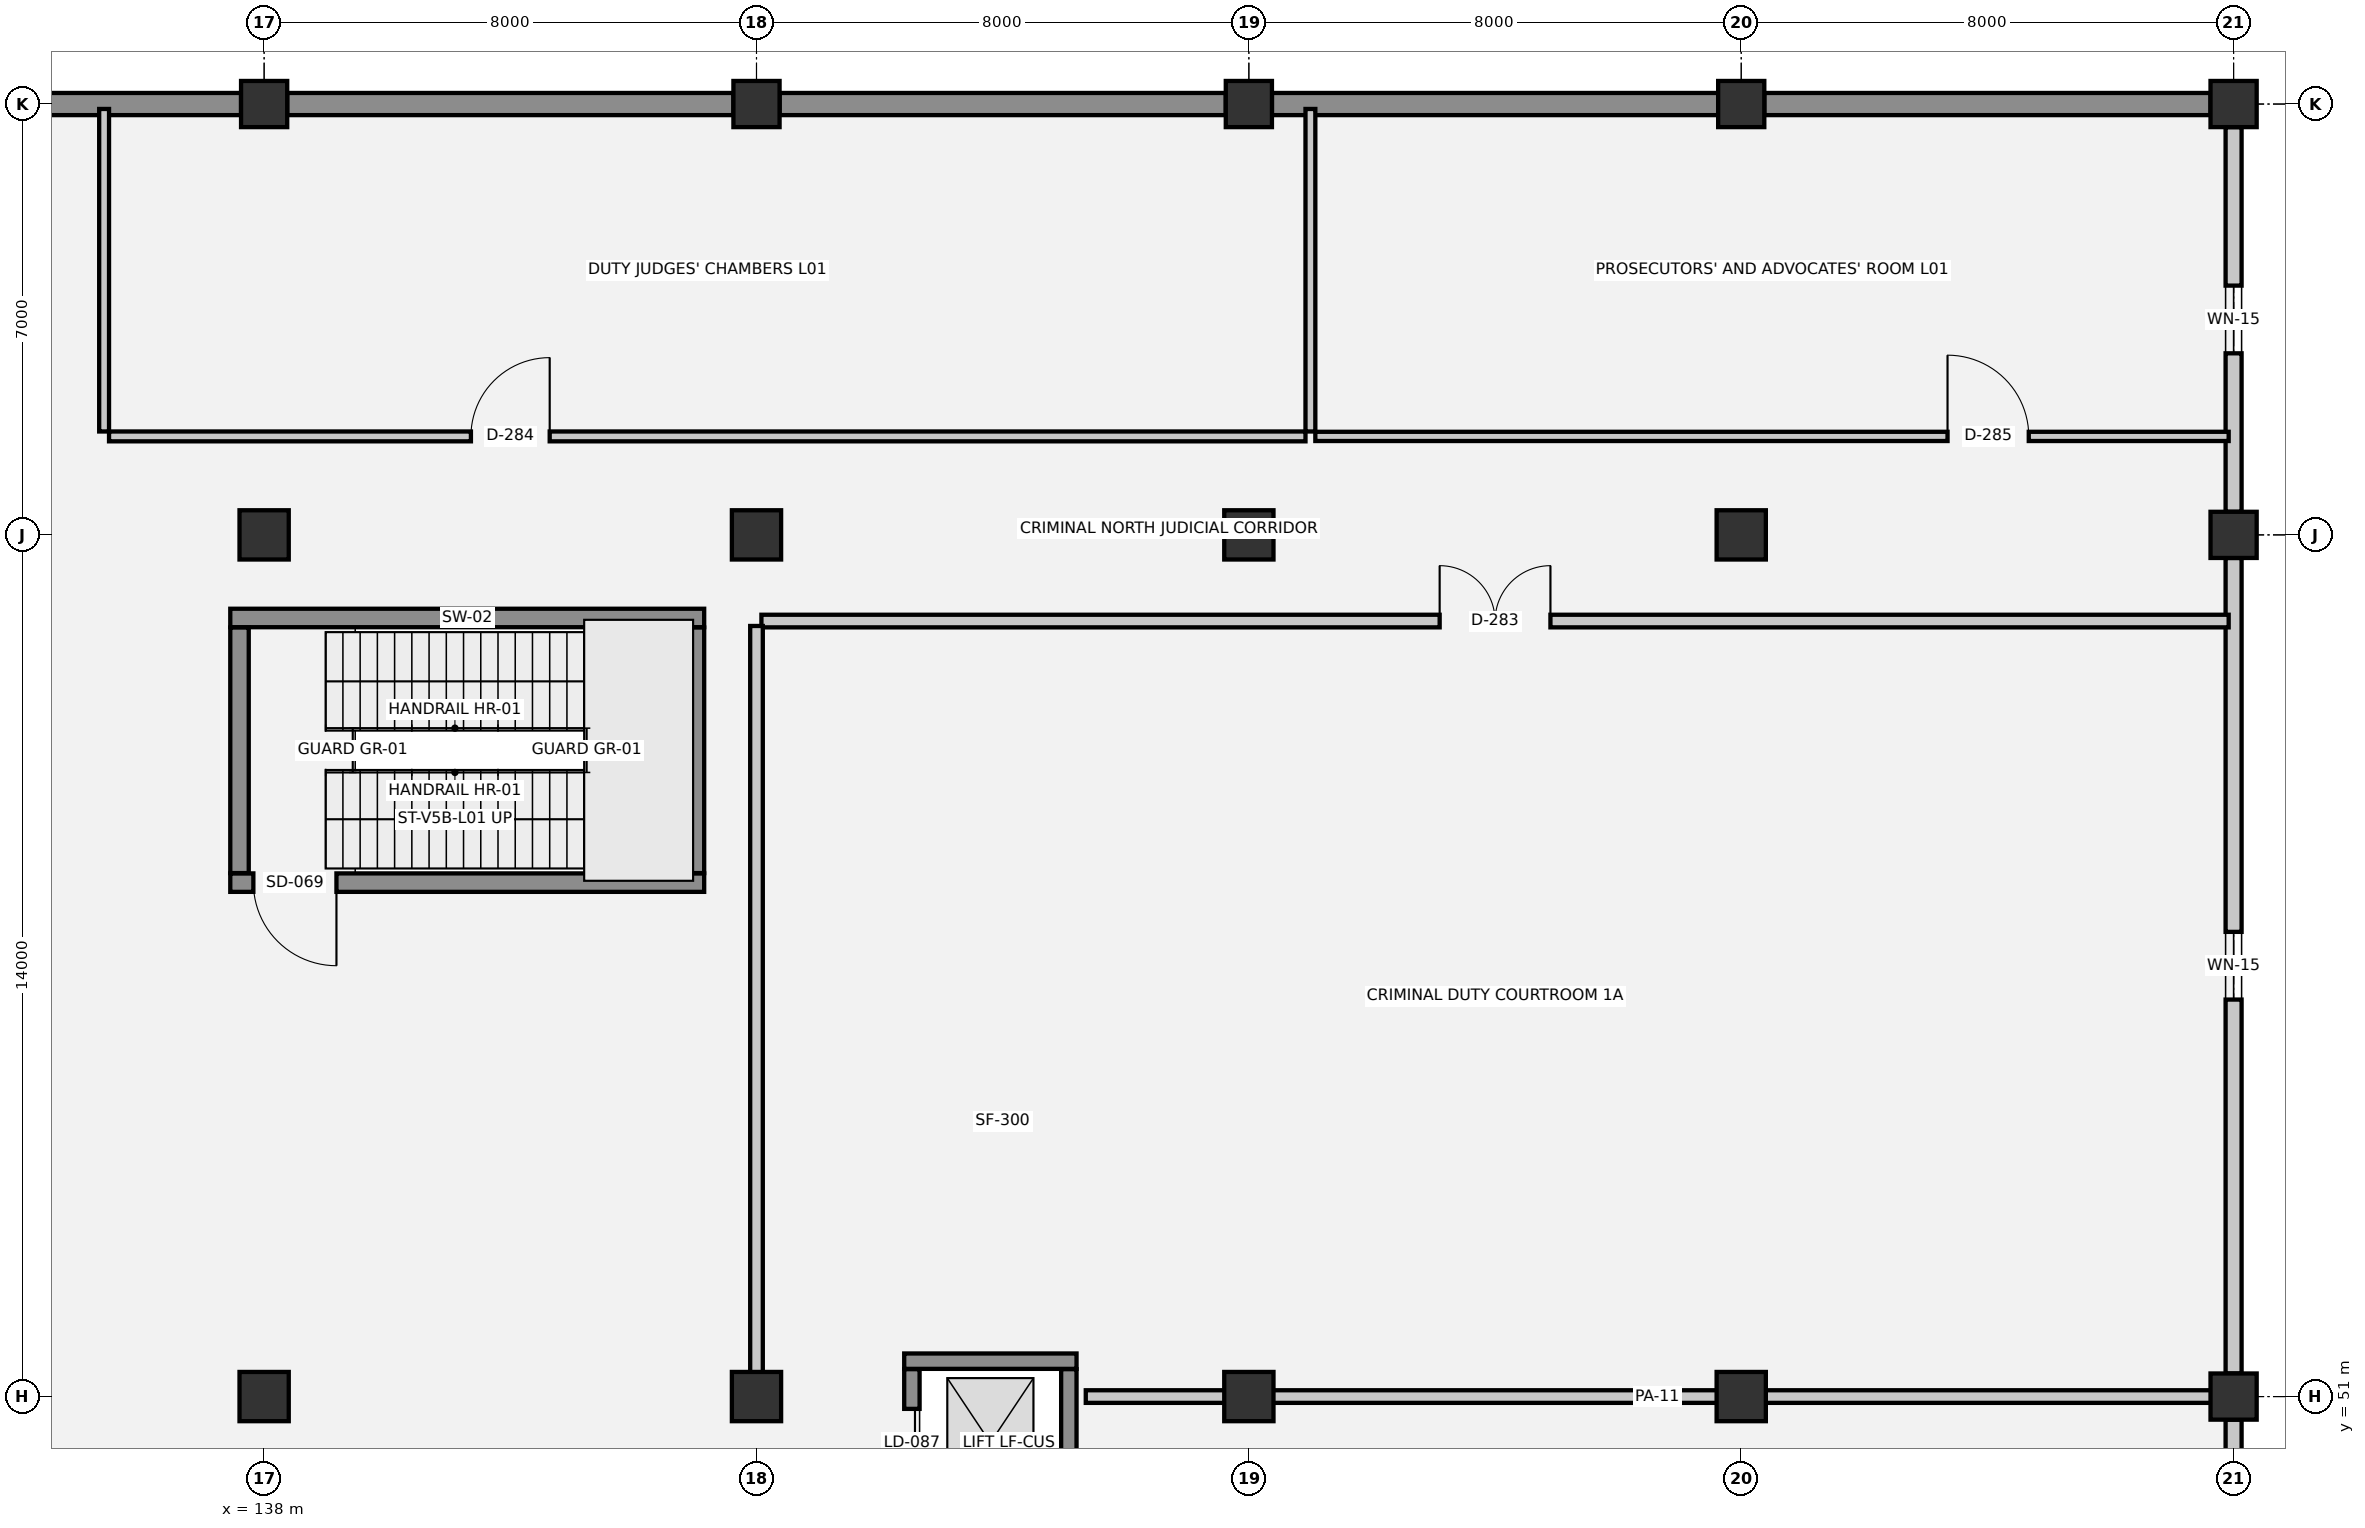
"""IFC4 building model, lengths in metres.
Left out: names, types, materials, properties, quantities, classifications, styles, units other than length and angle.
Written with IfcOpenShell. Run it as: python <this file> out.ifc"""

import sys

from ifc_helpers import new_model, si_unit, direction, frame, frame_2d, origin, origin_2d, place, context, subcontext, project, spatial, rectangle, extrude, element, fill, save


model = new_model("IFC4")
c1 = context("Model", 3, precision=1e-05, world=origin(), true_north=direction((0.0, 1.0)))
c2 = subcontext(c1, "Body", "Model", "MODEL_VIEW")
j1 = project(units=[si_unit("LENGTHUNIT", "METRE"), si_unit("PLANEANGLEUNIT", "RADIAN")], contexts=[c1])
p1 = place(None, origin())
s1 = spatial("IfcSite", under=j1, at=p1, CompositionType="ELEMENT")
p2 = place(p1, origin())
s2 = spatial("IfcBuilding", under=s1, at=p2, CompositionType="ELEMENT")
p3 = place(p2, origin())
s3 = spatial("IfcBuildingStorey", under=s2, at=p3, CompositionType="ELEMENT", Elevation=0.0)
for number, where, z_axis, x_axis in (
    (1, (138.0, 51.0, 0.0), (0.0, 0.0, 1.0), (1.0, 0.0, 0.0)),
    (2, (138.0, 65.0, 0.0), (0.0, 0.0, 1.0), (1.0, 0.0, 0.0)),
):
    element("IfcColumn", number, at=place(p3, frame(where, z_axis=z_axis, x_axis=x_axis)), inside=s3, PredefinedType="COLUMN", context=c2, shape_type="SweptSolid", body=[
        extrude(rectangle(XDim=0.8, YDim=0.8, at=origin_2d()), origin(), (0.0, 0.0, 1.0), 5.4),
    ])
p4 = place(p3, frame((138.0, 72.0, 0.0), z_axis=(0.0, 0.0, 1.0), x_axis=(1.0, 0.0, 0.0)))
e3 = element("IfcColumn", 3, at=p4, inside=s3, PredefinedType="COLUMN", context=c2, shape_type="SweptSolid", body=[
    extrude(rectangle(XDim=0.75, YDim=0.75, at=origin_2d()), origin(), (0.0, 0.0, 1.0), 5.4),
])
for number, where, z_axis, x_axis in (
    (4, (146.0, 51.0, 0.0), (0.0, 0.0, 1.0), (1.0, 0.0, 0.0)),
    (5, (146.0, 65.0, 0.0), (0.0, 0.0, 1.0), (1.0, 0.0, 0.0)),
):
    element("IfcColumn", number, at=place(p3, frame(where, z_axis=z_axis, x_axis=x_axis)), inside=s3, PredefinedType="COLUMN", context=c2, shape_type="SweptSolid", body=[
        extrude(rectangle(XDim=0.8, YDim=0.8, at=origin_2d()), origin(), (0.0, 0.0, 1.0), 5.4),
    ])
p5 = place(p3, frame((146.0, 72.0, 0.0), z_axis=(0.0, 0.0, 1.0), x_axis=(1.0, 0.0, 0.0)))
e6 = element("IfcColumn", 6, at=p5, inside=s3, PredefinedType="COLUMN", context=c2, shape_type="SweptSolid", body=[
    extrude(rectangle(XDim=0.75, YDim=0.75, at=origin_2d()), origin(), (0.0, 0.0, 1.0), 5.4),
])
for number, where, z_axis, x_axis in (
    (7, (154.0, 51.0, 0.0), (0.0, 0.0, 1.0), (1.0, 0.0, 0.0)),
    (8, (154.0, 65.0, 0.0), (0.0, 0.0, 1.0), (1.0, 0.0, 0.0)),
):
    element("IfcColumn", number, at=place(p3, frame(where, z_axis=z_axis, x_axis=x_axis)), inside=s3, PredefinedType="COLUMN", context=c2, shape_type="SweptSolid", body=[
        extrude(rectangle(XDim=0.8, YDim=0.8, at=origin_2d()), origin(), (0.0, 0.0, 1.0), 5.4),
    ])
p6 = place(p3, frame((154.0, 72.0, 0.0), z_axis=(0.0, 0.0, 1.0), x_axis=(1.0, 0.0, 0.0)))
e9 = element("IfcColumn", 9, at=p6, inside=s3, PredefinedType="COLUMN", context=c2, shape_type="SweptSolid", body=[
    extrude(rectangle(XDim=0.75, YDim=0.75, at=origin_2d()), origin(), (0.0, 0.0, 1.0), 5.4),
])
for number, where, z_axis, x_axis in (
    (10, (162.0, 51.0, 0.0), (0.0, 0.0, 1.0), (1.0, 0.0, 0.0)),
    (11, (162.0, 65.0, 0.0), (0.0, 0.0, 1.0), (1.0, 0.0, 0.0)),
):
    element("IfcColumn", number, at=place(p3, frame(where, z_axis=z_axis, x_axis=x_axis)), inside=s3, PredefinedType="COLUMN", context=c2, shape_type="SweptSolid", body=[
        extrude(rectangle(XDim=0.8, YDim=0.8, at=origin_2d()), origin(), (0.0, 0.0, 1.0), 5.4),
    ])
for number, where, z_axis, x_axis in (
    (12, (162.0, 72.0, 0.0), (0.0, 0.0, 1.0), (1.0, 0.0, 0.0)),
    (13, (170.0, 51.0, 0.0), (0.0, 0.0, 1.0), (1.0, 0.0, 0.0)),
    (14, (170.0, 65.0, 0.0), (0.0, 0.0, 1.0), (1.0, 0.0, 0.0)),
    (15, (170.0, 72.0, 0.0), (0.0, 0.0, 1.0), (1.0, 0.0, 0.0)),
):
    element("IfcColumn", number, at=place(p3, frame(where, z_axis=z_axis, x_axis=x_axis)), inside=s3, PredefinedType="COLUMN", context=c2, shape_type="SweptSolid", body=[
        extrude(rectangle(XDim=0.75, YDim=0.75, at=origin_2d()), origin(), (0.0, 0.0, 1.0), 5.4),
    ])
for number, where, z_axis, x_axis in (
    (16, (130.375, 72.0, 0.0), (0.0, 0.0, 1.0), (1.0, 0.0, 0.0)),
    (17, (138.375, 72.0, 0.0), (0.0, 0.0, 1.0), (1.0, 0.0, 0.0)),
    (18, (146.375, 72.0, 0.0), (0.0, 0.0, 1.0), (1.0, 0.0, 0.0)),
    (19, (154.375, 72.0, 0.0), (0.0, 0.0, 1.0), (1.0, 0.0, 0.0)),
    (20, (162.375, 72.0, 0.0), (0.0, 0.0, 1.0), (1.0, 0.0, 0.0)),
):
    element("IfcWall", number, at=place(p3, frame(where, z_axis=z_axis, x_axis=x_axis)), inside=s3, PredefinedType="SOLIDWALL", context=c2, shape_type="SweptSolid", body=[
        extrude(rectangle(XDim=7.25, YDim=0.36, at=frame_2d((3.625, 0.0))), origin(), (0.0, 0.0, 1.0), 5.1),
    ])
p7 = place(p3, frame((170.0, 71.625, 0.0), z_axis=(0.0, 0.0, 1.0), x_axis=(0.0, -1.0, 0.0)))
e21 = element("IfcWall", 21, at=p7, inside=s3, PredefinedType="SOLIDWALL", context=c2, shape_type="SweptSolid", body=[
    extrude(rectangle(XDim=6.25, YDim=0.26, at=frame_2d((3.125, 0.0))), origin(), (0.0, 0.0, 1.0), 4.13),
])
p8 = place(p7, frame((2.575, 0.0, 1.0)))
e22 = element("IfcOpeningElement", 22, at=p8, cuts=e21, PredefinedType="OPENING", context=c2, shape_type="SweptSolid", body=[
    extrude(rectangle(XDim=1.1, YDim=1.2, at=frame_2d((0.55, 0.6))), frame((0.0, 0.14, 0.0), z_axis=(0.0, -1.0, 0.0), x_axis=(1.0, 0.0, 0.0)), (0.0, 0.0, 1.0), 0.28),
])
p9 = place(p3, frame((170.0, 64.625, 0.0), z_axis=(0.0, 0.0, 1.0), x_axis=(0.0, -1.0, 0.0)))
e23 = element("IfcWall", 23, at=p9, inside=s3, PredefinedType="SOLIDWALL", context=c2, shape_type="SweptSolid", body=[
    extrude(rectangle(XDim=13.25, YDim=0.26, at=frame_2d((6.625, 0.0))), origin(), (0.0, 0.0, 1.0), 4.13),
])
p10 = place(p9, frame((6.075, 0.0, 1.0)))
e24 = element("IfcOpeningElement", 24, at=p10, cuts=e23, PredefinedType="OPENING", context=c2, shape_type="SweptSolid", body=[
    extrude(rectangle(XDim=1.1, YDim=1.2, at=frame_2d((0.55, 0.6))), frame((0.0, 0.14, 0.0), z_axis=(0.0, -1.0, 0.0), x_axis=(1.0, 0.0, 0.0)), (0.0, 0.0, 1.0), 0.28),
])
p11 = place(p3, frame((170.0, 50.625, 0.0), z_axis=(0.0, 0.0, 1.0), x_axis=(0.0, -1.0, 0.0)))
e25 = element("IfcWall", 25, at=p11, inside=s3, PredefinedType="SOLIDWALL", context=c2, shape_type="SweptSolid", body=[
    extrude(rectangle(XDim=6.25, YDim=0.26, at=frame_2d((3.125, 0.0))), origin(), (0.0, 0.0, 1.0), 4.13),
])
p12 = place(p11, frame((2.575, 0.0, 1.0)))
e26 = element("IfcOpeningElement", 26, at=p12, cuts=e25, PredefinedType="OPENING", context=c2, shape_type="SweptSolid", body=[
    extrude(rectangle(XDim=1.1, YDim=1.2, at=frame_2d((0.55, 0.6))), frame((0.0, 0.14, 0.0), z_axis=(0.0, -1.0, 0.0), x_axis=(1.0, 0.0, 0.0)), (0.0, 0.0, 1.0), 0.28),
])
p13 = place(p3, frame((151.2, 51.575, 0.0), z_axis=(0.0, 0.0, 1.0), x_axis=(-1.0, 0.0, 0.0)))
e27 = element("IfcWall", 27, at=p13, inside=s3, PredefinedType="SHEAR", context=c2, shape_type="SweptSolid", body=[
    extrude(rectangle(XDim=2.8, YDim=0.25, at=frame_2d((1.4, 0.0))), origin(), (0.0, 0.0, 1.0), 5.4),
])
p14 = place(p3, frame((148.525, 51.445, 0.0), z_axis=(0.0, 0.0, 1.0), x_axis=(0.0, -1.0, 0.0)))
e28 = element("IfcWall", 28, at=p14, inside=s3, PredefinedType="SHEAR", context=c2, shape_type="SweptSolid", body=[
    extrude(rectangle(XDim=2.39, YDim=0.25, at=frame_2d((1.195, 0.0))), origin(), (0.0, 0.0, 1.0), 5.4),
])
p15 = place(p14, frame((0.645, 0.0, 0.0)))
e29 = element("IfcOpeningElement", 29, at=p15, cuts=e28, PredefinedType="OPENING", context=c2, shape_type="SweptSolid", body=[
    extrude(rectangle(XDim=1.1, YDim=2.15, at=frame_2d((0.55, 1.075))), frame((0.0, 0.135, 0.0), z_axis=(0.0, -1.0, 0.0), x_axis=(1.0, 0.0, 0.0)), (0.0, 0.0, 1.0), 0.27),
])
p16 = place(p3, frame((151.075, 49.055, 0.0), z_axis=(0.0, 0.0, 1.0), x_axis=(0.0, 1.0, 0.0)))
e30 = element("IfcWall", 30, at=p16, inside=s3, PredefinedType="SHEAR", context=c2, shape_type="SweptSolid", body=[
    extrude(rectangle(XDim=2.39, YDim=0.25, at=frame_2d((1.195, 0.0))), origin(), (0.0, 0.0, 1.0), 5.4),
])
p17 = place(p3, frame((145.15, 63.65, 0.0), z_axis=(0.0, 0.0, 1.0), x_axis=(-1.0, 0.0, 0.0)))
e31 = element("IfcWall", 31, at=p17, inside=s3, PredefinedType="SHEAR", context=c2, shape_type="SweptSolid", body=[
    extrude(rectangle(XDim=7.7, YDim=0.3, at=frame_2d((3.85, 0.0))), origin(), (0.0, 0.0, 1.0), 5.1),
])
p18 = place(p3, frame((145.15, 59.35, 0.0), z_axis=(0.0, 0.0, 1.0), x_axis=(-1.0, 0.0, 0.0)))
e32 = element("IfcWall", 32, at=p18, inside=s3, PredefinedType="SHEAR", context=c2, shape_type="SweptSolid", body=[
    extrude(rectangle(XDim=7.7, YDim=0.3, at=frame_2d((3.85, 0.0))), origin(), (0.0, 0.0, 1.0), 5.1),
])
p19 = place(p18, frame((5.975, 0.0, 0.0)))
e33 = element("IfcOpeningElement", 33, at=p19, cuts=e32, PredefinedType="OPENING", context=c2, shape_type="SweptSolid", body=[
    extrude(rectangle(XDim=1.35, YDim=2.2, at=frame_2d((0.675, 1.1))), frame((0.0, 0.16, 0.0), z_axis=(0.0, -1.0, 0.0), x_axis=(1.0, 0.0, 0.0)), (0.0, 0.0, 1.0), 0.32),
])
for number, where, z_axis, x_axis in (
    (34, (137.6, 63.495, 0.0), (0.0, 0.0, 1.0), (0.0, -1.0, 0.0)),
    (35, (145.0, 59.505, 0.0), (0.0, 0.0, 1.0), (0.0, 1.0, 0.0)),
):
    element("IfcWall", number, at=place(p3, frame(where, z_axis=z_axis, x_axis=x_axis)), inside=s3, PredefinedType="SHEAR", context=c2, shape_type="SweptSolid", body=[
        extrude(rectangle(XDim=3.99, YDim=0.3, at=frame_2d((1.995, 0.0))), origin(), (0.0, 0.0, 1.0), 5.1),
    ])
p20 = place(p3, frame((151.35, 51.0, 0.0), z_axis=(0.0, 0.0, 1.0), x_axis=(1.0, 0.0, 0.0)))
e36 = element("IfcWall", 36, at=p20, inside=s3, PredefinedType="PARTITIONING", context=c2, shape_type="SweptSolid", body=[
    extrude(rectangle(XDim=18.57, YDim=0.205, at=frame_2d((9.285, 0.0))), origin(), (0.0, 0.0, 1.0), 4.35),
])
p21 = place(p3, frame((146.08, 63.6, 0.0), z_axis=(0.0, 0.0, 1.0), x_axis=(1.0, 0.0, 0.0)))
e37 = element("IfcWall", 37, at=p21, inside=s3, PredefinedType="PARTITIONING", context=c2, shape_type="SweptSolid", body=[
    extrude(rectangle(XDim=23.84, YDim=0.205, at=frame_2d((11.92, 0.0))), origin(), (0.0, 0.0, 1.0), 5.04),
])
p22 = place(p21, frame((11.02, 0.0, 0.0)))
e38 = element("IfcOpeningElement", 38, at=p22, cuts=e37, PredefinedType="OPENING", context=c2, shape_type="SweptSolid", body=[
    extrude(rectangle(XDim=1.8, YDim=2.3, at=frame_2d((0.9, 1.15))), frame((0.0, 0.113, 0.0), z_axis=(0.0, -1.0, 0.0), x_axis=(1.0, 0.0, 0.0)), (0.0, 0.0, 1.0), 0.225),
])
p23 = place(p3, frame((135.48, 66.6, 0.0), z_axis=(0.0, 0.0, 1.0), x_axis=(1.0, 0.0, 0.0)))
e39 = element("IfcWall", 39, at=p23, inside=s3, PredefinedType="PARTITIONING", context=c2, shape_type="SweptSolid", body=[
    extrude(rectangle(XDim=19.44, YDim=0.16, at=frame_2d((9.72, 0.0))), origin(), (0.0, 0.0, 1.0), 5.04),
])
p24 = place(p23, frame((5.88, 0.0, 0.0)))
e40 = element("IfcOpeningElement", 40, at=p24, cuts=e39, PredefinedType="OPENING", context=c2, shape_type="SweptSolid", body=[
    extrude(rectangle(XDim=1.28, YDim=2.2, at=frame_2d((0.64, 1.1))), frame((0.0, 0.09, 0.0), z_axis=(0.0, -1.0, 0.0), x_axis=(1.0, 0.0, 0.0)), (0.0, 0.0, 1.0), 0.18),
])
p25 = place(p3, frame((155.08, 66.6, 0.0), z_axis=(0.0, 0.0, 1.0), x_axis=(1.0, 0.0, 0.0)))
e41 = element("IfcWall", 41, at=p25, inside=s3, PredefinedType="PARTITIONING", context=c2, shape_type="SweptSolid", body=[
    extrude(rectangle(XDim=14.84, YDim=0.15, at=frame_2d((7.42, 0.0))), origin(), (0.0, 0.0, 1.0), 5.04),
])
p26 = place(p25, frame((10.272, 0.0, 0.0)))
e42 = element("IfcOpeningElement", 42, at=p26, cuts=e41, PredefinedType="OPENING", context=c2, shape_type="SweptSolid", body=[
    extrude(rectangle(XDim=1.32, YDim=2.2, at=frame_2d((0.66, 1.1))), frame((0.0, 0.085, 0.0), z_axis=(0.0, -1.0, 0.0), x_axis=(1.0, 0.0, 0.0)), (0.0, 0.0, 1.0), 0.17),
])
p27 = place(p3, frame((135.4, 66.68, 0.0), z_axis=(0.0, 0.0, 1.0), x_axis=(0.0, 1.0, 0.0)))
e43 = element("IfcWall", 43, at=p27, inside=s3, PredefinedType="PARTITIONING", context=c2, shape_type="SweptSolid", body=[
    extrude(rectangle(XDim=5.24, YDim=0.16, at=frame_2d((2.62, 0.0))), origin(), (0.0, 0.0, 1.0), 5.04),
])
p28 = place(p3, frame((146.0, 51.35, 0.0), z_axis=(0.0, 0.0, 1.0), x_axis=(0.0, 1.0, 0.0)))
e44 = element("IfcWall", 44, at=p28, inside=s3, PredefinedType="PARTITIONING", context=c2, shape_type="SweptSolid", body=[
    extrude(rectangle(XDim=12.17, YDim=0.205, at=frame_2d((6.085, 0.0))), origin(), (0.0, 0.0, 1.0), 4.15),
])
p29 = place(p3, frame((155.0, 66.68, 0.0), z_axis=(0.0, 0.0, 1.0), x_axis=(0.0, 1.0, 0.0)))
e45 = element("IfcWall", 45, at=p29, inside=s3, PredefinedType="PARTITIONING", context=c2, shape_type="SweptSolid", body=[
    extrude(rectangle(XDim=5.24, YDim=0.16, at=frame_2d((2.62, 0.0))), origin(), (0.0, 0.0, 1.0), 5.04),
])
p30 = place(p8, origin())
e46 = element("IfcWindow", 46, at=p30, inside=s3, PartitioningType="SINGLE_PANEL", PredefinedType="WINDOW", context=c2, shape_type="SweptSolid", body=[
    extrude(rectangle(XDim=1.1, YDim=1.2, at=frame_2d((0.55, 0.6))), frame((0.0, 0.03, 0.0), z_axis=(0.0, -1.0, 0.0), x_axis=(1.0, 0.0, 0.0)), (0.0, 0.0, 1.0), 0.06),
])
fill(e22, e46)
p31 = place(p10, origin())
e47 = element("IfcWindow", 47, at=p31, inside=s3, PartitioningType="SINGLE_PANEL", PredefinedType="WINDOW", context=c2, shape_type="SweptSolid", body=[
    extrude(rectangle(XDim=1.1, YDim=1.2, at=frame_2d((0.55, 0.6))), frame((0.0, 0.03, 0.0), z_axis=(0.0, -1.0, 0.0), x_axis=(1.0, 0.0, 0.0)), (0.0, 0.0, 1.0), 0.06),
])
fill(e24, e47)
p32 = place(p15, origin())
e48 = element("IfcDoor", 48, at=p32, inside=s3, OperationType="DOUBLE_DOOR_SLIDING", PredefinedType="DOOR", context=c2, shape_type="SweptSolid", body=[
    extrude(rectangle(XDim=1.1, YDim=2.15, at=frame_2d((0.55, 1.075))), frame((0.0, 0.025, 0.0), z_axis=(0.0, -1.0, 0.0), x_axis=(1.0, 0.0, 0.0)), (0.0, 0.0, 1.0), 0.05),
])
fill(e29, e48)
p33 = place(p19, origin())
e49 = element("IfcDoor", 49, at=p33, inside=s3, OperationType="SINGLE_SWING_LEFT", PredefinedType="DOOR", context=c2, shape_type="SweptSolid", body=[
    extrude(rectangle(XDim=1.35, YDim=2.2, at=frame_2d((0.675, 1.1))), frame((0.0, 0.025, 0.0), z_axis=(0.0, -1.0, 0.0), x_axis=(1.0, 0.0, 0.0)), (0.0, 0.0, 1.0), 0.05),
])
fill(e33, e49)
p34 = place(p22, origin())
e50 = element("IfcDoor", 50, at=p34, inside=s3, OperationType="DOUBLE_DOOR_SINGLE_SWING", PredefinedType="DOOR", context=c2, shape_type="SweptSolid", body=[
    extrude(rectangle(XDim=1.8, YDim=2.3, at=frame_2d((0.9, 1.15))), frame((0.0, 0.025, 0.0), z_axis=(0.0, -1.0, 0.0), x_axis=(1.0, 0.0, 0.0)), (0.0, 0.0, 1.0), 0.05),
])
fill(e38, e50)
p35 = place(p24, origin())
e51 = element("IfcDoor", 51, at=p35, inside=s3, OperationType="SINGLE_SWING_RIGHT", PredefinedType="DOOR", context=c2, shape_type="SweptSolid", body=[
    extrude(rectangle(XDim=1.28, YDim=2.2, at=frame_2d((0.64, 1.1))), frame((0.0, 0.025, 0.0), z_axis=(0.0, -1.0, 0.0), x_axis=(1.0, 0.0, 0.0)), (0.0, 0.0, 1.0), 0.05),
])
fill(e40, e51)
p36 = place(p26, origin())
e52 = element("IfcDoor", 52, at=p36, inside=s3, OperationType="SINGLE_SWING_LEFT", PredefinedType="DOOR", context=c2, shape_type="SweptSolid", body=[
    extrude(rectangle(XDim=1.32, YDim=2.2, at=frame_2d((0.66, 1.1))), frame((0.0, 0.025, 0.0), z_axis=(0.0, -1.0, 0.0), x_axis=(1.0, 0.0, 0.0)), (0.0, 0.0, 1.0), 0.05),
])
fill(e42, e52)
save(model, sys.argv[1])
